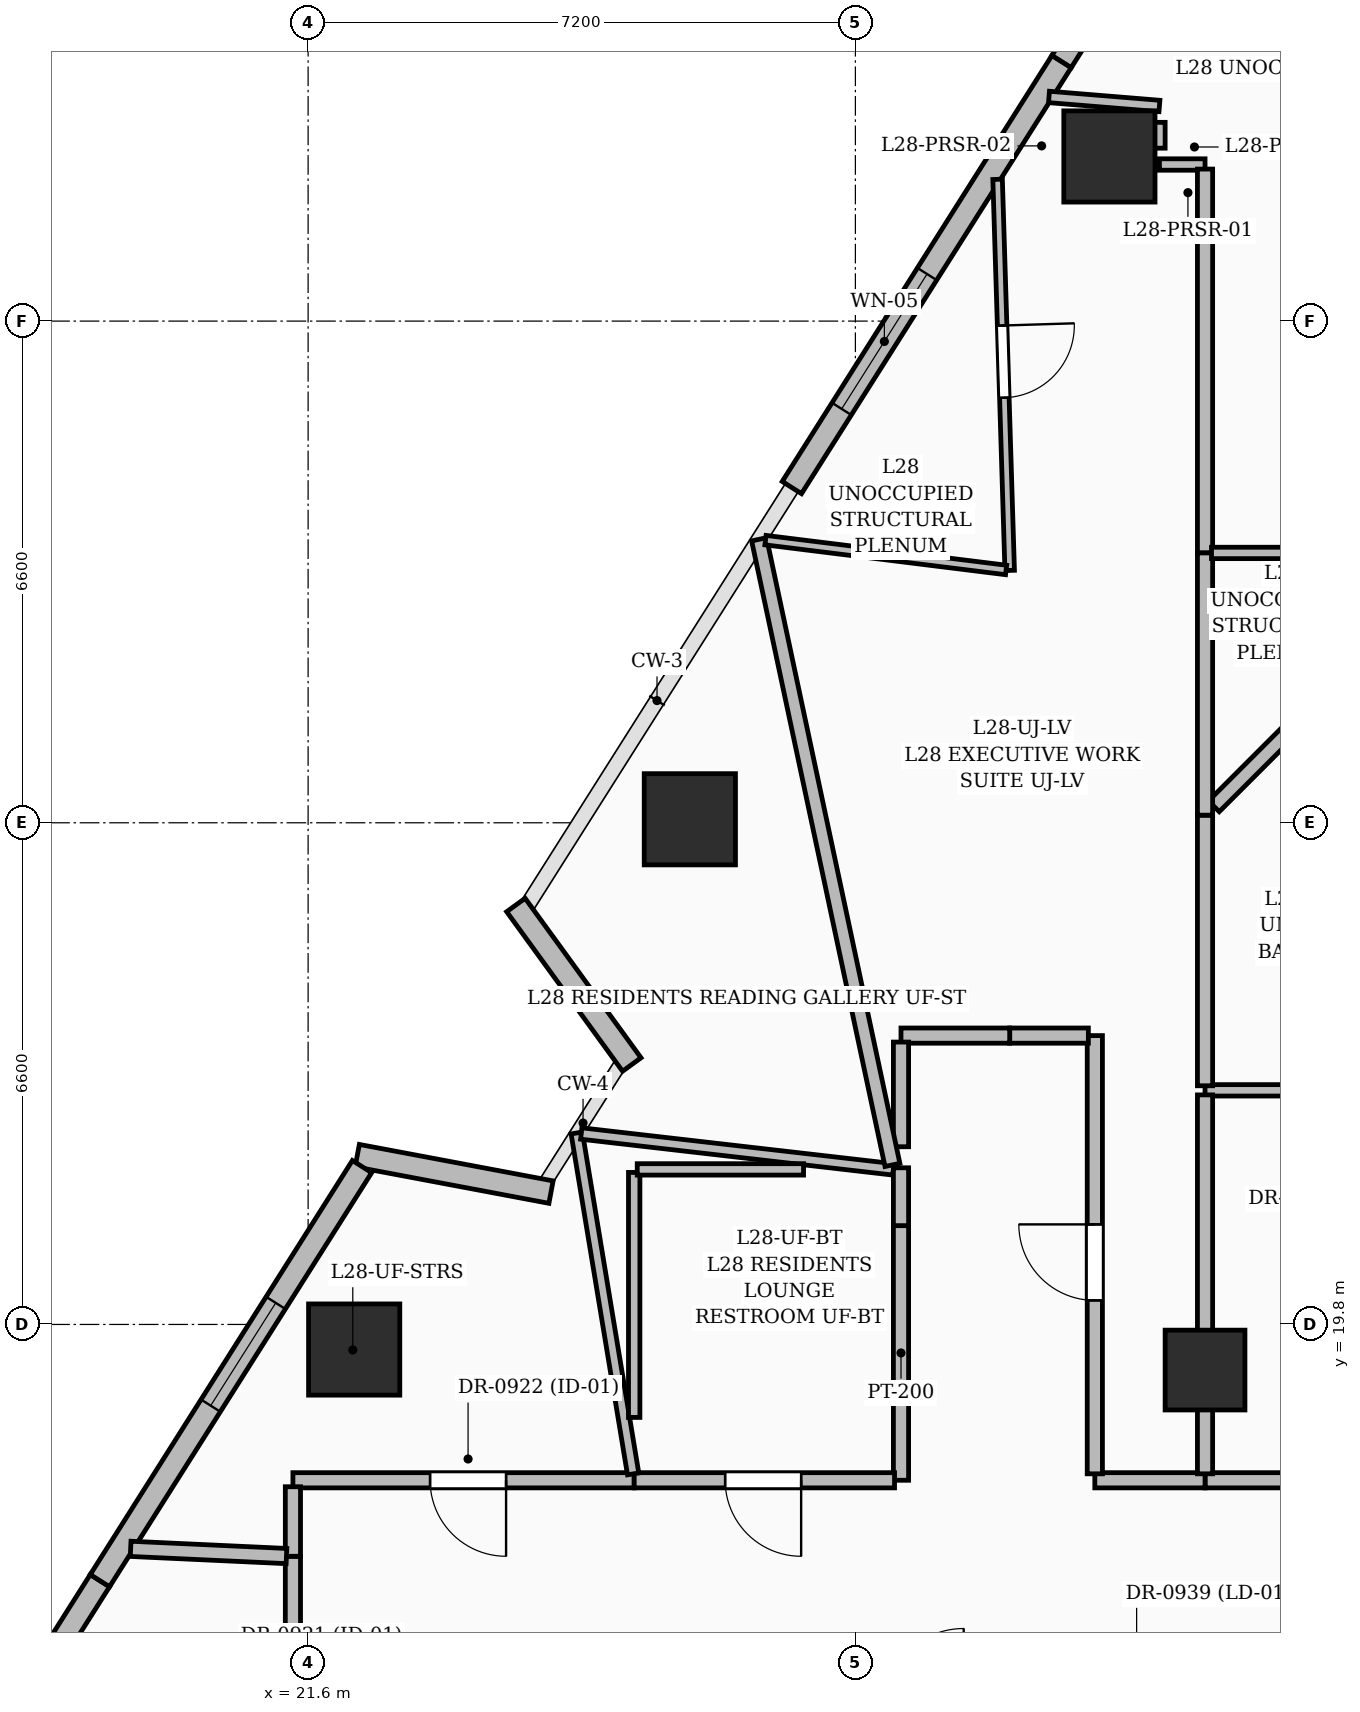
"""IFC4 building model, lengths in metres.
Left out: names, types, materials, properties, quantities, classifications, styles, units other than length and angle.
Written with IfcOpenShell. Run it as: python <this file> out.ifc"""

import sys

from ifc_helpers import new_model, si_unit, direction, frame, frame_2d, origin, origin_2d, place, context, subcontext, project, spatial, rectangle, extrude, element, fill, save


model = new_model("IFC4")
c1 = context("Model", 3, precision=1e-05, world=origin(), true_north=direction((0.0, 1.0)))
c2 = subcontext(c1, "Body", "Model", "MODEL_VIEW")
j1 = project(units=[si_unit("LENGTHUNIT", "METRE"), si_unit("PLANEANGLEUNIT", "RADIAN")], contexts=[c1])
p1 = place(None, origin())
s1 = spatial("IfcSite", under=j1, at=p1, CompositionType="ELEMENT")
p2 = place(p1, origin())
s2 = spatial("IfcBuilding", under=s1, at=p2, CompositionType="ELEMENT")
p3 = place(p2, frame((0.0, 0.0, 114.0)))
s3 = spatial("IfcBuildingStorey", under=s2, at=p3, CompositionType="ELEMENT", Elevation=114.0)
p4 = place(p3, frame((33.4, 19.2, 0.0), z_axis=(0.0, 0.0, 1.0), x_axis=(1.0, 0.0, 0.0)))
e1 = element("IfcColumn", 1, at=p4, inside=s3, PredefinedType="COLUMN", context=c2, shape_type="SweptSolid", body=[
    extrude(rectangle(XDim=1.05, YDim=1.05, at=origin_2d()), origin(), (0.0, 0.0, 1.0), 3.6),
])
for number, where, z_axis, x_axis in (
    (2, (32.142, 35.166, 0.0), (0.0, 0.0, 1.0), (1.0, 0.0, 0.0)),
    (3, (26.622, 26.446, 0.0), (0.0, 0.0, 1.0), (1.0, 0.0, 0.0)),
    (4, (22.206, 19.47, 0.0), (0.0, 0.0, 1.0), (1.0, 0.0, 0.0)),
):
    element("IfcColumn", number, at=place(p3, frame(where, z_axis=z_axis, x_axis=x_axis)), inside=s3, PredefinedType="COLUMN", context=c2, shape_type="SweptSolid", body=[
        extrude(rectangle(XDim=1.2, YDim=1.2, at=origin_2d()), origin(), (0.0, 0.0, 1.0), 3.6),
    ])
for number, where, z_axis, x_axis in (
    (5, (22.246, 22.021, 0.0), (0.0, 0.0, 1.0), (0.983, -0.185, 0.0)),
    (6, (25.858, 23.22, 0.0), (0.0, 0.0, 1.0), (-0.588, 0.809, 0.0)),
):
    element("IfcWall", number, at=place(p3, frame(where, z_axis=z_axis, x_axis=x_axis)), inside=s3, PredefinedType="SOLIDWALL", context=c2, shape_type="SweptSolid", body=[
        extrude(rectangle(XDim=2.594, YDim=0.3, at=frame_2d((1.297, 0.0))), origin(), (0.0, 0.0, 1.0), 2.575),
    ])
p5 = place(p3, frame((27.964, 30.81, 0.0), z_axis=(0.0, 0.0, 1.0), x_axis=(0.534892719091, 0.844919983823, 0.0)))
e7 = element("IfcWall", 7, at=p5, inside=s3, PredefinedType="SOLIDWALL", context=c2, shape_type="SweptSolid", body=[
    extrude(rectangle(XDim=6.634, YDim=0.3, at=frame_2d((3.317, 0.0))), origin(), (0.0, 0.0, 1.0), 3.35),
])
p6 = place(p5, frame((1.225, 0.0, 0.55)))
e8 = element("IfcOpeningElement", 8, at=p6, cuts=e7, PredefinedType="OPENING", context=c2, shape_type="SweptSolid", body=[
    extrude(rectangle(XDim=2.1, YDim=2.4, at=frame_2d((1.05, 1.2))), frame((0.0, 0.16, 0.0), z_axis=(0.0, -1.0, 0.0), x_axis=(1.0, 0.0, 0.0)), (0.0, 0.0, 1.0), 0.32),
])
p7 = place(p3, frame((31.513, 36.415, 0.0), z_axis=(0.0, 0.0, 1.0), x_axis=(0.534892719091, 0.844919983823, 0.0)))
e9 = element("IfcWall", 9, at=p7, inside=s3, PredefinedType="SOLIDWALL", context=c2, shape_type="SweptSolid", body=[
    extrude(rectangle(XDim=6.634, YDim=0.3, at=frame_2d((3.317, 0.0))), origin(), (0.0, 0.0, 1.0), 3.35),
])
p8 = place(p7, frame((0.6, 0.0, 0.55)))
e10 = element("IfcOpeningElement", 10, at=p8, cuts=e9, PredefinedType="OPENING", context=c2, shape_type="SweptSolid", body=[
    extrude(rectangle(XDim=1.6, YDim=2.2, at=frame_2d((0.8, 1.1))), frame((0.0, 0.16, 0.0), z_axis=(0.0, -1.0, 0.0), x_axis=(1.0, 0.0, 0.0)), (0.0, 0.0, 1.0), 0.32),
])
p9 = place(p7, frame((3.35, 0.0, 0.55)))
e11 = element("IfcOpeningElement", 11, at=p9, cuts=e9, PredefinedType="OPENING", context=c2, shape_type="SweptSolid", body=[
    extrude(rectangle(XDim=1.6, YDim=2.2, at=frame_2d((0.8, 1.1))), frame((0.0, 0.16, 0.0), z_axis=(0.0, -1.0, 0.0), x_axis=(1.0, 0.0, 0.0)), (0.0, 0.0, 1.0), 0.32),
])
p10 = place(p3, frame((15.262, 10.746, 0.0), z_axis=(0.0, 0.0, 1.0), x_axis=(0.534880248718, 0.844927878302, 0.0)))
e12 = element("IfcWall", 12, at=p10, inside=s3, PredefinedType="SOLIDWALL", context=c2, shape_type="SweptSolid", body=[
    extrude(rectangle(XDim=6.727, YDim=0.3, at=frame_2d((3.364, 0.0))), origin(), (0.0, 0.0, 1.0), 3.35),
])
p11 = place(p10, frame((0.875, 0.0, 0.6)))
e13 = element("IfcOpeningElement", 13, at=p11, cuts=e12, PredefinedType="OPENING", context=c2, shape_type="SweptSolid", body=[
    extrude(rectangle(XDim=1.8, YDim=2.1, at=frame_2d((0.9, 1.05))), frame((0.0, 0.16, 0.0), z_axis=(0.0, -1.0, 0.0), x_axis=(1.0, 0.0, 0.0)), (0.0, 0.0, 1.0), 0.32),
])
p12 = place(p3, frame((18.861, 16.429, 0.0), z_axis=(0.0, 0.0, 1.0), x_axis=(0.534891708764, 0.844920623429, 0.0)))
e14 = element("IfcWall", 14, at=p12, inside=s3, PredefinedType="SOLIDWALL", context=c2, shape_type="SweptSolid", body=[
    extrude(rectangle(XDim=6.447, YDim=0.3, at=frame_2d((3.224, 0.0))), origin(), (0.0, 0.0, 1.0), 3.35),
])
p13 = place(p12, frame((2.725, 0.0, 0.55)))
e15 = element("IfcOpeningElement", 15, at=p13, cuts=e14, PredefinedType="OPENING", context=c2, shape_type="SweptSolid", body=[
    extrude(rectangle(XDim=1.6, YDim=2.2, at=frame_2d((0.8, 1.1))), frame((0.0, 0.16, 0.0), z_axis=(0.0, -1.0, 0.0), x_axis=(1.0, 0.0, 0.0)), (0.0, 0.0, 1.0), 0.32),
])
p14 = place(p3, frame((21.4, 16.75, 0.0), z_axis=(0.0, 0.0, 1.0), x_axis=(0.0, -1.0, 0.0)))
e16 = element("IfcWall", 16, at=p14, inside=s3, PredefinedType="PARTITIONING", context=c2, shape_type="SweptSolid", body=[
    extrude(rectangle(XDim=4.5, YDim=0.2, at=frame_2d((2.25, 0.0))), origin(), (0.0, 0.0, 1.0), 2.712),
])
p15 = place(p14, frame((1.69, 0.0, 0.0)))
e17 = element("IfcOpeningElement", 17, at=p15, cuts=e16, PredefinedType="OPENING", context=c2, shape_type="SweptSolid", body=[
    extrude(rectangle(XDim=1.0, YDim=2.2, at=frame_2d((0.5, 1.1))), frame((0.0, 0.11, 0.0), z_axis=(0.0, -1.0, 0.0), x_axis=(1.0, 0.0, 0.0)), (0.0, 0.0, 1.0), 0.22),
])
p16 = place(p3, frame((25.89, 17.75, 0.0), z_axis=(0.0, 0.0, 1.0), x_axis=(-1.0, 0.0, 0.0)))
e18 = element("IfcWall", 18, at=p16, inside=s3, PredefinedType="PARTITIONING", context=c2, shape_type="SweptSolid", body=[
    extrude(rectangle(XDim=4.49, YDim=0.2, at=frame_2d((2.245, 0.0))), origin(), (0.0, 0.0, 1.0), 2.372),
])
p17 = place(p16, frame((1.686, 0.0, 0.0)))
e19 = element("IfcOpeningElement", 19, at=p17, cuts=e18, PredefinedType="OPENING", context=c2, shape_type="SweptSolid", body=[
    extrude(rectangle(XDim=1.0, YDim=2.2, at=frame_2d((0.5, 1.1))), frame((0.0, 0.11, 0.0), z_axis=(0.0, -1.0, 0.0), x_axis=(1.0, 0.0, 0.0)), (0.0, 0.0, 1.0), 0.22),
])
p18 = place(p3, frame((21.4, 17.665, 0.0), z_axis=(0.0, 0.0, 1.0), x_axis=(0.0, -1.0, 0.0)))
e20 = element("IfcWall", 20, at=p18, inside=s3, PredefinedType="PARTITIONING", context=c2, shape_type="SweptSolid", body=[
    extrude(rectangle(XDim=0.915, YDim=0.2, at=frame_2d((0.458, 0.0))), origin(), (0.0, 0.0, 1.0), 2.57),
])
p19 = place(p3, frame((29.4, 21.1, 0.0), z_axis=(0.0, 0.0, 1.0), x_axis=(0.0, -1.0, 0.0)))
e21 = element("IfcWall", 21, at=p19, inside=s3, PredefinedType="PARTITIONING", context=c2, shape_type="SweptSolid", body=[
    extrude(rectangle(XDim=3.35, YDim=0.2, at=frame_2d((1.675, 0.0))), origin(), (0.0, 0.0, 1.0), 2.712),
])
p20 = place(p3, frame((29.315, 17.75, 0.0), z_axis=(0.0, 0.0, 1.0), x_axis=(-1.0, 0.0, 0.0)))
e22 = element("IfcWall", 22, at=p20, inside=s3, PredefinedType="PARTITIONING", context=c2, shape_type="SweptSolid", body=[
    extrude(rectangle(XDim=3.425, YDim=0.2, at=frame_2d((1.712, 0.0))), origin(), (0.0, 0.0, 1.0), 2.712),
])
p21 = place(p20, frame((1.229, 0.0, 0.0)))
e23 = element("IfcOpeningElement", 23, at=p21, cuts=e22, PredefinedType="OPENING", context=c2, shape_type="SweptSolid", body=[
    extrude(rectangle(XDim=1.0, YDim=2.2, at=frame_2d((0.5, 1.1))), frame((0.0, 0.11, 0.0), z_axis=(0.0, -1.0, 0.0), x_axis=(1.0, 0.0, 0.0)), (0.0, 0.0, 1.0), 0.22),
])
p22 = place(p3, frame((36.4, 17.75, 0.0), z_axis=(0.0, 0.0, 1.0), x_axis=(-1.0, 0.0, 0.0)))
e24 = element("IfcWall", 24, at=p22, inside=s3, PredefinedType="PARTITIONING", context=c2, shape_type="SweptSolid", body=[
    extrude(rectangle(XDim=3.0, YDim=0.2, at=frame_2d((1.5, 0.0))), origin(), (0.0, 0.0, 1.0), 2.436),
])
p23 = place(p3, frame((33.4, 17.75, 0.0), z_axis=(0.0, 0.0, 1.0), x_axis=(-1.0, 0.0, 0.0)))
e25 = element("IfcWall", 25, at=p23, inside=s3, PredefinedType="PARTITIONING", context=c2, shape_type="SweptSolid", body=[
    extrude(rectangle(XDim=1.45, YDim=0.2, at=frame_2d((0.725, 0.0))), origin(), (0.0, 0.0, 1.0), 3.35),
])
p24 = place(p3, frame((31.95, 17.835, 0.0), z_axis=(0.0, 0.0, 1.0), x_axis=(0.0, 1.0, 0.0)))
e26 = element("IfcWall", 26, at=p24, inside=s3, PredefinedType="PARTITIONING", context=c2, shape_type="SweptSolid", body=[
    extrude(rectangle(XDim=5.765, YDim=0.2, at=frame_2d((2.883, 0.0))), origin(), (0.0, 0.0, 1.0), 2.372),
])
p25 = place(p24, frame((2.281, 0.0, 0.0)))
e27 = element("IfcOpeningElement", 27, at=p25, cuts=e26, PredefinedType="OPENING", context=c2, shape_type="SweptSolid", body=[
    extrude(rectangle(XDim=1.0, YDim=2.2, at=frame_2d((0.5, 1.1))), frame((0.0, 0.11, 0.0), z_axis=(0.0, -1.0, 0.0), x_axis=(1.0, 0.0, 0.0)), (0.0, 0.0, 1.0), 0.22),
])
p26 = place(p3, frame((31.865, 23.6, 0.0), z_axis=(0.0, 0.0, 1.0), x_axis=(-1.0, 0.0, 0.0)))
e28 = element("IfcWall", 28, at=p26, inside=s3, PredefinedType="PARTITIONING", context=c2, shape_type="SweptSolid", body=[
    extrude(rectangle(XDim=1.035, YDim=0.2, at=frame_2d((0.518, 0.0))), origin(), (0.0, 0.0, 1.0), 2.712),
])
p27 = place(p3, frame((30.83, 23.6, 0.0), z_axis=(0.0, 0.0, 1.0), x_axis=(-1.0, 0.0, 0.0)))
e29 = element("IfcWall", 29, at=p27, inside=s3, PredefinedType="PARTITIONING", context=c2, shape_type="SweptSolid", body=[
    extrude(rectangle(XDim=1.43, YDim=0.2, at=frame_2d((0.715, 0.0))), origin(), (0.0, 0.0, 1.0), 2.372),
])
p28 = place(p3, frame((29.4, 23.515, 0.0), z_axis=(0.0, 0.0, 1.0), x_axis=(0.0, -1.0, 0.0)))
e30 = element("IfcWall", 30, at=p28, inside=s3, PredefinedType="PARTITIONING", context=c2, shape_type="SweptSolid", body=[
    extrude(rectangle(XDim=1.377, YDim=0.2, at=frame_2d((0.688, 0.0))), origin(), (0.0, 0.0, 1.0), 2.372),
])
p29 = place(p3, frame((21.315, 16.753, 0.0), z_axis=(0.0, 0.0, 1.0), x_axis=(-0.998928926466, 0.046270939795, 0.0)))
e31 = element("IfcWall", 31, at=p29, inside=s3, PredefinedType="PARTITIONING", context=c2, shape_type="SweptSolid", body=[
    extrude(rectangle(XDim=2.052, YDim=0.2, at=frame_2d((1.026, 0.0))), origin(), (0.0, 0.0, 1.0), 2.57),
])
p30 = place(p3, frame((25.876, 17.834, 0.0), z_axis=(0.0, 0.0, 1.0), x_axis=(-0.163258044995, 0.986583402832, 0.0)))
e32 = element("IfcWall", 32, at=p30, inside=s3, PredefinedType="PARTITIONING", context=c2, shape_type="SweptSolid", body=[
    extrude(rectangle(XDim=4.546, YDim=0.15, at=frame_2d((2.273, 0.0))), origin(), (0.0, 0.0, 1.0), 2.712),
])
p31 = place(p3, frame((29.3, 21.84, 0.0), z_axis=(0.0, 0.0, 1.0), x_axis=(-0.993461085134, 0.114171241234, 0.0)))
e33 = element("IfcWall", 33, at=p31, inside=s3, PredefinedType="PARTITIONING", context=c2, shape_type="SweptSolid", body=[
    extrude(rectangle(XDim=4.134, YDim=0.15, at=frame_2d((2.067, 0.0))), origin(), (0.0, 0.0, 1.0), 2.712),
])
p32 = place(p3, frame((29.288, 21.899, 0.0), z_axis=(0.0, 0.0, 1.0), x_axis=(-0.208508604507, 0.978020532426, 0.0)))
e34 = element("IfcWall", 34, at=p32, inside=s3, PredefinedType="PARTITIONING", context=c2, shape_type="SweptSolid", body=[
    extrude(rectangle(XDim=8.415, YDim=0.2, at=frame_2d((4.208, 0.0))), origin(), (0.0, 0.0, 1.0), 2.372),
])
p33 = place(p3, frame((33.4, 22.88, 0.0), z_axis=(0.0, 0.0, 1.0), x_axis=(1.0, 0.0, 0.0)))
e35 = element("IfcWall", 35, at=p33, inside=s3, PredefinedType="PARTITIONING", context=c2, shape_type="SweptSolid", body=[
    extrude(rectangle(XDim=2.94, YDim=0.15, at=frame_2d((1.47, 0.0))), origin(), (0.0, 0.0, 1.0), 2.436),
])
p34 = place(p33, frame((1.075, 0.0, 0.0)))
e36 = element("IfcOpeningElement", 36, at=p34, cuts=e35, PredefinedType="OPENING", context=c2, shape_type="SweptSolid", body=[
    extrude(rectangle(XDim=0.85, YDim=2.1, at=frame_2d((0.425, 1.05))), frame((0.0, 0.085, 0.0), z_axis=(0.0, -1.0, 0.0), x_axis=(1.0, 0.0, 0.0)), (0.0, 0.0, 1.0), 0.17),
])
p35 = place(p3, frame((33.4, 26.5, 0.0), z_axis=(0.0, 0.0, 1.0), x_axis=(0.0, -1.0, 0.0)))
e37 = element("IfcWall", 37, at=p35, inside=s3, PredefinedType="PARTITIONING", context=c2, shape_type="SweptSolid", body=[
    extrude(rectangle(XDim=3.56, YDim=0.2, at=frame_2d((1.78, 0.0))), origin(), (0.0, 0.0, 1.0), 2.712),
])
p36 = place(p3, frame((36.358, 29.458, 0.0), z_axis=(0.0, 0.0, 1.0), x_axis=(-0.707137163672, -0.707076397395, 0.0)))
e38 = element("IfcWall", 38, at=p36, inside=s3, PredefinedType="PARTITIONING", context=c2, shape_type="SweptSolid", body=[
    extrude(rectangle(XDim=4.018, YDim=0.2, at=frame_2d((2.009, 0.0))), origin(), (0.0, 0.0, 1.0), 2.372),
])
p37 = place(p3, frame((33.4, 22.82, 0.0), z_axis=(0.0, 0.0, 1.0), x_axis=(0.0, -1.0, 0.0)))
e39 = element("IfcWall", 39, at=p37, inside=s3, PredefinedType="PARTITIONING", context=c2, shape_type="SweptSolid", body=[
    extrude(rectangle(XDim=4.985, YDim=0.2, at=frame_2d((2.493, 0.0))), origin(), (0.0, 0.0, 1.0), 2.436),
])
p38 = place(p3, frame((33.4, 35.06, 0.0), z_axis=(0.0, 0.0, 1.0), x_axis=(-1.0, 0.0, 0.0)))
e40 = element("IfcWall", 40, at=p38, inside=s3, PredefinedType="PARTITIONING", context=c2, shape_type="SweptSolid", body=[
    extrude(rectangle(XDim=0.6, YDim=0.15, at=frame_2d((0.3, 0.0))), origin(), (0.0, 0.0, 1.0), 2.57),
])
p39 = place(p3, frame((30.671, 34.865, 0.0), z_axis=(0.0, 0.0, 1.0), x_axis=(0.030923800782, -0.999521744909, 0.0)))
e41 = element("IfcWall", 41, at=p39, inside=s3, PredefinedType="PARTITIONING", context=c2, shape_type="SweptSolid", body=[
    extrude(rectangle(XDim=5.147, YDim=0.125, at=frame_2d((2.574, 0.0))), origin(), (0.0, 0.0, 1.0), 2.57),
])
p40 = place(p39, frame((1.924, 0.0, 0.0)))
e42 = element("IfcOpeningElement", 42, at=p40, cuts=e41, PredefinedType="OPENING", context=c2, shape_type="SweptSolid", body=[
    extrude(rectangle(XDim=0.95, YDim=2.2, at=frame_2d((0.475, 1.1))), frame((0.0, 0.072, 0.0), z_axis=(0.0, -1.0, 0.0), x_axis=(1.0, 0.0, 0.0)), (0.0, 0.0, 1.0), 0.145),
])
p41 = place(p3, frame((33.4, 29.95, 0.0), z_axis=(0.0, 0.0, 1.0), x_axis=(0.0, 1.0, 0.0)))
e43 = element("IfcWall", 43, at=p41, inside=s3, PredefinedType="PARTITIONING", context=c2, shape_type="SweptSolid", body=[
    extrude(rectangle(XDim=5.05, YDim=0.2, at=frame_2d((2.525, 0.0))), origin(), (0.0, 0.0, 1.0), 2.372),
])
p42 = place(p3, frame((33.4, 26.5, 0.0), z_axis=(0.0, 0.0, 1.0), x_axis=(0.0, 1.0, 0.0)))
e44 = element("IfcWall", 44, at=p42, inside=s3, PredefinedType="PARTITIONING", context=c2, shape_type="SweptSolid", body=[
    extrude(rectangle(XDim=3.45, YDim=0.2, at=frame_2d((1.725, 0.0))), origin(), (0.0, 0.0, 1.0), 2.712),
])
p43 = place(p3, frame((27.617, 30.118, 0.0), z_axis=(0.0, 0.0, 1.0), x_axis=(0.992397517991, -0.123073824536, 0.0)))
e45 = element("IfcWall", 45, at=p43, inside=s3, PredefinedType="PARTITIONING", context=c2, shape_type="SweptSolid", body=[
    extrude(rectangle(XDim=3.19, YDim=0.125, at=frame_2d((1.595, 0.0))), origin(), (0.0, 0.0, 1.0), 2.57),
])
p44 = place(p3, frame((33.485, 29.95, 0.0), z_axis=(0.0, 0.0, 1.0), x_axis=(1.0, 0.0, 0.0)))
e46 = element("IfcWall", 46, at=p44, inside=s3, PredefinedType="PARTITIONING", context=c2, shape_type="SweptSolid", body=[
    extrude(rectangle(XDim=3.28, YDim=0.15, at=frame_2d((1.64, 0.0))), origin(), (0.0, 0.0, 1.0), 2.372),
])
p45 = place(p3, frame((25.89, 18.577, 0.0), z_axis=(0.0, 0.0, 1.0), x_axis=(0.0, 1.0, 0.0)))
e47 = element("IfcWall", 47, at=p45, inside=s3, PredefinedType="PARTITIONING", context=c2, shape_type="SweptSolid", body=[
    extrude(rectangle(XDim=3.223, YDim=0.15, at=frame_2d((1.612, 0.0))), origin(), (0.0, 0.0, 1.0), 2.712),
])
p46 = place(p3, frame((25.93, 21.84, 0.0), z_axis=(0.0, 0.0, 1.0), x_axis=(1.0, 0.0, 0.0)))
e48 = element("IfcWall", 48, at=p46, inside=s3, PredefinedType="PARTITIONING", context=c2, shape_type="SweptSolid", body=[
    extrude(rectangle(XDim=2.188, YDim=0.15, at=frame_2d((1.094, 0.0))), origin(), (0.0, 0.0, 1.0), 2.712),
])
p47 = place(p3, frame((31.347, 35.949, 0.0), z_axis=(0.0, 0.0, 1.0), x_axis=(0.996669356606, -0.081548719198, 0.0)))
e49 = element("IfcWall", 49, at=p47, inside=s3, PredefinedType="PARTITIONING", context=c2, shape_type="SweptSolid", body=[
    extrude(rectangle(XDim=1.458, YDim=0.15, at=frame_2d((0.729, 0.0))), origin(), (0.0, 0.0, 1.0), 3.35),
])
p48 = place(p3, frame((32.8, 35.615, 0.0), z_axis=(0.0, 0.0, 1.0), x_axis=(0.0, -1.0, 0.0)))
e50 = element("IfcWall", 50, at=p48, inside=s3, PredefinedType="PARTITIONING", context=c2, shape_type="SweptSolid", body=[
    extrude(rectangle(XDim=0.34, YDim=0.15, at=frame_2d((0.17, 0.0))), origin(), (0.0, 0.0, 1.0), 2.57),
])
p49 = place(p3, frame((29.4, 21.861, 0.0), z_axis=(0.0, 0.0, 1.0), x_axis=(0.0, -1.0, 0.0)))
e51 = element("IfcWall", 51, at=p49, inside=s3, PredefinedType="PARTITIONING", context=c2, shape_type="SweptSolid", body=[
    extrude(rectangle(XDim=0.761, YDim=0.2, at=frame_2d((0.38, 0.0))), origin(), (0.0, 0.0, 1.0), 2.372),
])
p50 = place(p6, origin())
e52 = element("IfcWindow", 52, at=p50, inside=s3, PartitioningType="SINGLE_PANEL", PredefinedType="WINDOW", context=c2, shape_type="SweptSolid", body=[
    extrude(rectangle(XDim=2.1, YDim=2.4, at=frame_2d((1.05, 1.2))), frame((0.0, 0.03, 0.0), z_axis=(0.0, -1.0, 0.0), x_axis=(1.0, 0.0, 0.0)), (0.0, 0.0, 1.0), 0.06),
])
fill(e8, e52)
p51 = place(p13, origin())
e53 = element("IfcWindow", 53, at=p51, inside=s3, PartitioningType="SINGLE_PANEL", PredefinedType="WINDOW", context=c2, shape_type="SweptSolid", body=[
    extrude(rectangle(XDim=1.6, YDim=2.2, at=frame_2d((0.8, 1.1))), frame((0.0, 0.03, 0.0), z_axis=(0.0, -1.0, 0.0), x_axis=(1.0, 0.0, 0.0)), (0.0, 0.0, 1.0), 0.06),
])
fill(e15, e53)
p52 = place(p17, origin())
e54 = element("IfcDoor", 54, at=p52, inside=s3, OperationType="SINGLE_SWING_LEFT", PredefinedType="DOOR", context=c2, shape_type="SweptSolid", body=[
    extrude(rectangle(XDim=1.0, YDim=2.2, at=frame_2d((0.5, 1.1))), frame((0.0, 0.025, 0.0), z_axis=(0.0, -1.0, 0.0), x_axis=(1.0, 0.0, 0.0)), (0.0, 0.0, 1.0), 0.05),
])
fill(e19, e54)
p53 = place(p25, origin())
e55 = element("IfcDoor", 55, at=p53, inside=s3, OperationType="SINGLE_SWING_RIGHT", PredefinedType="DOOR", context=c2, shape_type="SweptSolid", body=[
    extrude(rectangle(XDim=1.0, YDim=2.2, at=frame_2d((0.5, 1.1))), frame((0.0, 0.025, 0.0), z_axis=(0.0, -1.0, 0.0), x_axis=(1.0, 0.0, 0.0)), (0.0, 0.0, 1.0), 0.05),
])
fill(e27, e55)
p54 = place(p40, origin())
e56 = element("IfcDoor", 56, at=p54, inside=s3, OperationType="SINGLE_SWING_LEFT", PredefinedType="DOOR", context=c2, shape_type="SweptSolid", body=[
    extrude(rectangle(XDim=0.95, YDim=2.2, at=frame_2d((0.475, 1.1))), frame((0.0, 0.025, 0.0), z_axis=(0.0, -1.0, 0.0), x_axis=(1.0, 0.0, 0.0)), (0.0, 0.0, 1.0), 0.05),
])
fill(e42, e56)
p55 = place(p21, origin())
e57 = element("IfcDoor", 57, at=p55, inside=s3, OperationType="SINGLE_SWING_LEFT", PredefinedType="DOOR", context=c2, shape_type="SweptSolid", body=[
    extrude(rectangle(XDim=1.0, YDim=2.2, at=frame_2d((0.5, 1.1))), frame((0.0, 0.025, 0.0), z_axis=(0.0, -1.0, 0.0), x_axis=(1.0, 0.0, 0.0)), (0.0, 0.0, 1.0), 0.05),
])
fill(e23, e57)
save(model, sys.argv[1])
